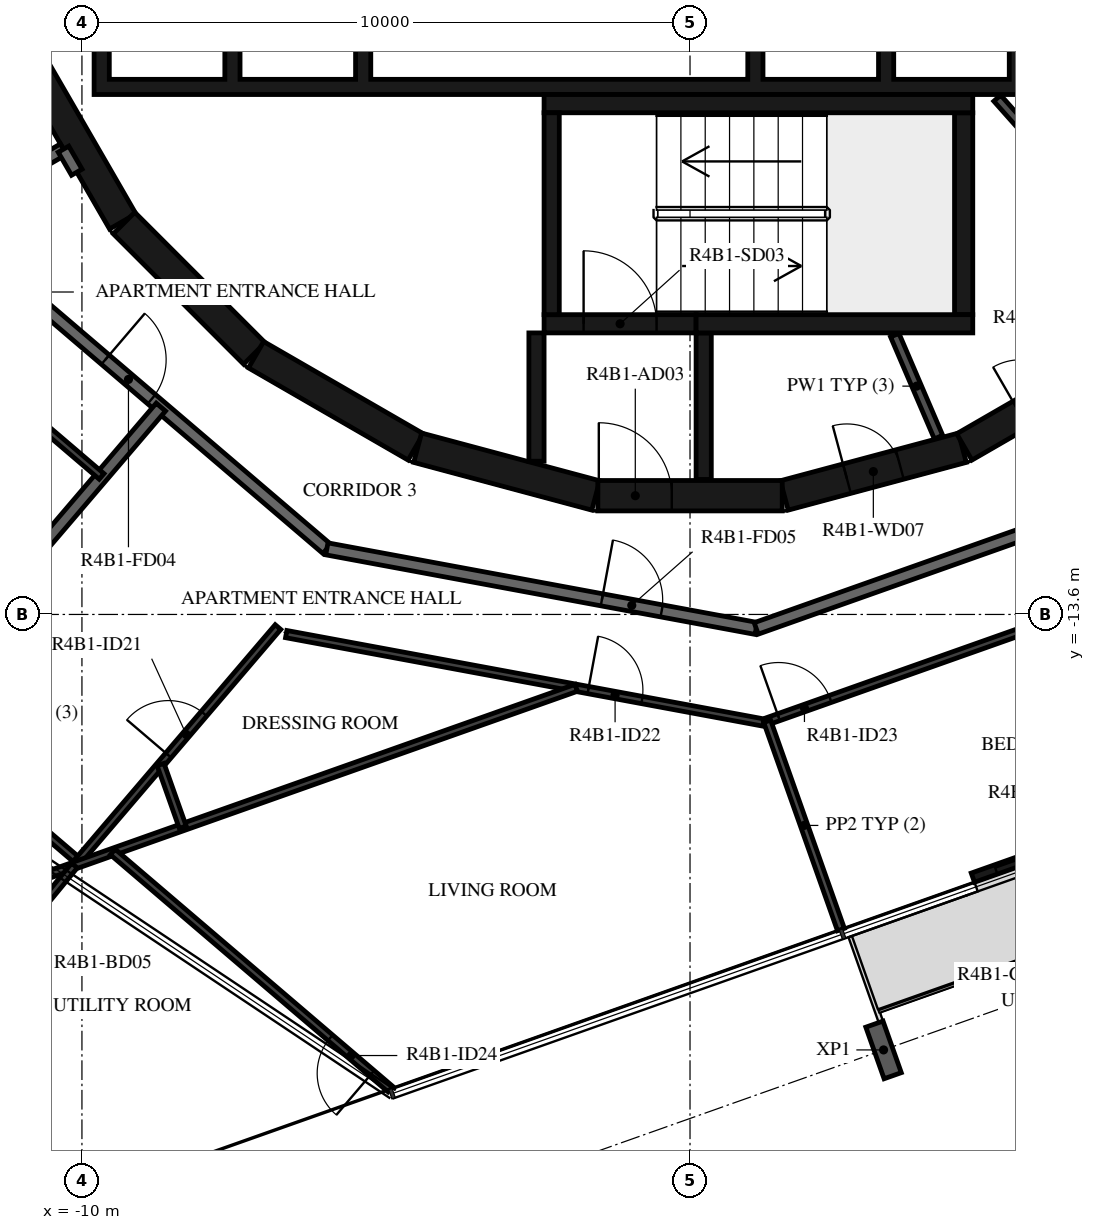
"""IFC4 building model, lengths in metres.
Left out: names, types, materials, properties, quantities, classifications, styles, units other than length and angle.
Written with IfcOpenShell. Run it as: python <this file> out.ifc"""

import sys

from ifc_helpers import new_model, si_unit, direction, frame, frame_2d, origin, origin_2d, place, context, subcontext, project, spatial, polyline, rectangle, i_section, outline, extrude, element, fill, save


model = new_model("IFC4")
c1 = context("Model", 3, precision=1e-05, world=origin(), true_north=direction((0.0, 1.0)))
c2 = subcontext(c1, "Body", "Model", "MODEL_VIEW")
j1 = project(units=[si_unit("LENGTHUNIT", "METRE"), si_unit("PLANEANGLEUNIT", "RADIAN")], contexts=[c1])
p1 = place(None, origin())
s1 = spatial("IfcSite", under=j1, at=p1, CompositionType="ELEMENT")
p2 = place(p1, origin())
s2 = spatial("IfcBuilding", under=s1, at=p2, CompositionType="ELEMENT")
p3 = place(p2, frame((0.0, 0.0, 162.2)))
s3 = spatial("IfcBuildingStorey", under=s2, at=p3, CompositionType="ELEMENT", Elevation=162.2)
p4 = place(p3, frame((3.183, -20.761, -0.38), z_axis=(0.0, 0.0, 1.0), x_axis=(-0.942641392079, -0.333807138839, 0.0)))
e1 = element("IfcColumn", 1, at=p4, inside=s3, PredefinedType="COLUMN", context=c2, shape_type="SweptSolid", body=[
    extrude(i_section(OverallWidth=0.3, OverallDepth=0.9, WebThickness=0.019, FlangeThickness=0.035, FilletRadius=0.03, at=origin_2d()), origin(), (0.0, 0.0, 1.0), 3.5),
])
p5 = place(p3, frame((4.652, -17.929, 0.0), z_axis=(0.0, 0.0, 1.0), x_axis=(0.942620722428, 0.333865502335, 0.0)))
e2 = element("IfcWall", 2, at=p5, inside=s3, PredefinedType="STANDARD", context=c2, shape_type="SweptSolid", body=[
    extrude(rectangle(XDim=3.2, YDim=0.16, at=frame_2d((1.6, 0.0))), origin(), (0.0, 0.0, 1.0), 3.12),
])
p6 = place(p5, frame((0.4, 0.0, 0.0)))
e3 = element("IfcOpeningElement", 3, at=p6, cuts=e2, PredefinedType="OPENING", context=c2, shape_type="SweptSolid", body=[
    extrude(rectangle(XDim=2.4, YDim=2.4, at=frame_2d((1.2, 1.2))), frame((0.0, 0.09, 0.0), z_axis=(0.0, -1.0, 0.0), x_axis=(1.0, 0.0, 0.0)), (0.0, 0.0, 1.0), 0.18),
])
p7 = place(p3, frame((1.55, -11.643, 0.0), z_axis=(0.0, 0.0, 1.0), x_axis=(0.965948410781, 0.258734743916, 0.0)))
e4 = element("IfcWall", 4, at=p7, inside=s3, PredefinedType="SHEAR", context=c2, shape_type="SweptSolid", body=[
    extrude(rectangle(XDim=3.033, YDim=0.5, at=frame_2d((1.516, 0.0))), origin(), (0.0, 0.0, 1.0), 3.12),
])
p8 = place(p7, frame((1.066, 0.0, 0.0)))
e5 = element("IfcOpeningElement", 5, at=p8, cuts=e4, PredefinedType="OPENING", context=c2, shape_type="SweptSolid", body=[
    extrude(rectangle(XDim=0.9, YDim=2.1, at=frame_2d((0.45, 1.05))), frame((0.0, 0.26, 0.0), z_axis=(0.0, -1.0, 0.0), x_axis=(1.0, 0.0, 0.0)), (0.0, 0.0, 1.0), 0.52),
])
p9 = place(p3, frame((4.51, -10.845, 0.0), z_axis=(0.0, 0.0, 1.0), x_axis=(0.865975092491, 0.500087131594, 0.0)))
e6 = element("IfcWall", 6, at=p9, inside=s3, PredefinedType="SHEAR", context=c2, shape_type="SweptSolid", body=[
    extrude(rectangle(XDim=3.033, YDim=0.5, at=frame_2d((1.516, 0.0))), origin(), (0.0, 0.0, 1.0), 3.12),
])
p10 = place(p9, frame((1.066, 0.0, 0.0)))
e7 = element("IfcOpeningElement", 7, at=p10, cuts=e6, PredefinedType="OPENING", context=c2, shape_type="SweptSolid", body=[
    extrude(rectangle(XDim=0.9, YDim=2.1, at=frame_2d((0.45, 1.05))), frame((0.0, 0.26, 0.0), z_axis=(0.0, -1.0, 0.0), x_axis=(1.0, 0.0, 0.0)), (0.0, 0.0, 1.0), 0.52),
])
p11 = place(p3, frame((-10.845, -4.51, 0.0), z_axis=(0.0, 0.0, 1.0), x_axis=(0.500087131594, -0.865975092491, 0.0)))
e8 = element("IfcWall", 8, at=p11, inside=s3, PredefinedType="SHEAR", context=c2, shape_type="SweptSolid", body=[
    extrude(rectangle(XDim=3.033, YDim=0.5, at=frame_2d((1.516, 0.0))), origin(), (0.0, 0.0, 1.0), 3.12),
])
p12 = place(p3, frame((-9.308, -7.164, 0.0), z_axis=(0.0, 0.0, 1.0), x_axis=(0.707106781187, -0.707106781187, 0.0)))
e9 = element("IfcWall", 9, at=p12, inside=s3, PredefinedType="SHEAR", context=c2, shape_type="SweptSolid", body=[
    extrude(rectangle(XDim=3.032, YDim=0.5, at=frame_2d((1.516, 0.0))), origin(), (0.0, 0.0, 1.0), 3.12),
])
for number, where, z_axis, x_axis in (
    (10, (-7.137, -9.329, 0.0), (0.0, 0.0, 1.0), (0.866, -0.5, 0.0)),
    (11, (-4.479, -10.858, 0.0), (0.0, 0.0, 1.0), (0.966, -0.259, 0.0)),
):
    element("IfcWall", number, at=place(p3, frame(where, z_axis=z_axis, x_axis=x_axis)), inside=s3, PredefinedType="SHEAR", context=c2, shape_type="SweptSolid", body=[
        extrude(rectangle(XDim=3.033, YDim=0.5, at=frame_2d((1.516, 0.0))), origin(), (0.0, 0.0, 1.0), 3.12),
    ])
p13 = place(p3, frame((-1.516, -11.647, 0.0), z_axis=(0.0, 0.0, 1.0), x_axis=(1.0, 0.0, 0.0)))
e12 = element("IfcWall", 12, at=p13, inside=s3, PredefinedType="SHEAR", context=c2, shape_type="SweptSolid", body=[
    extrude(rectangle(XDim=3.033, YDim=0.5, at=frame_2d((1.516, 0.0))), origin(), (0.0, 0.0, 1.0), 3.12),
])
p14 = place(p13, frame((0.016, 0.0, 0.0)))
e13 = element("IfcOpeningElement", 13, at=p14, cuts=e12, PredefinedType="OPENING", context=c2, shape_type="SweptSolid", body=[
    extrude(rectangle(XDim=1.2, YDim=2.1, at=frame_2d((0.6, 1.05))), frame((0.0, 0.26, 0.0), z_axis=(0.0, -1.0, 0.0), x_axis=(1.0, 0.0, 0.0)), (0.0, 0.0, 1.0), 0.52),
])
p15 = place(p3, frame((-2.275, -8.67, 0.0), z_axis=(0.0, 0.0, 1.0), x_axis=(0.0, 1.0, 0.0)))
e14 = element("IfcWall", 14, at=p15, inside=s3, PredefinedType="SHEAR", context=c2, shape_type="SweptSolid", body=[
    extrude(rectangle(XDim=3.32, YDim=0.25, at=frame_2d((1.66, 0.0))), origin(), (0.0, 0.0, 1.0), 3.12),
])
p16 = place(p3, frame((-2.4, -5.2, 0.0), z_axis=(0.0, 0.0, 1.0), x_axis=(1.0, 0.0, 0.0)))
e15 = element("IfcWall", 15, at=p16, inside=s3, PredefinedType="SHEAR", context=c2, shape_type="SweptSolid", body=[
    extrude(rectangle(XDim=7.05, YDim=0.3, at=frame_2d((3.525, 0.0))), origin(), (0.0, 0.0, 1.0), 3.12),
])
p17 = place(p3, frame((4.5, -8.67, 0.0), z_axis=(0.0, 0.0, 1.0), x_axis=(0.0, 1.0, 0.0)))
e16 = element("IfcWall", 16, at=p17, inside=s3, PredefinedType="SHEAR", context=c2, shape_type="SweptSolid", body=[
    extrude(rectangle(XDim=3.32, YDim=0.3, at=frame_2d((1.66, 0.0))), origin(), (0.0, 0.0, 1.0), 3.12),
])
p18 = place(p3, frame((0.1, -8.82, 0.0), z_axis=(0.0, 0.0, 1.0), x_axis=(1.0, 0.0, 0.0)))
e17 = element("IfcWall", 17, at=p18, inside=s3, PredefinedType="SHEAR", context=c2, shape_type="SweptSolid", body=[
    extrude(rectangle(XDim=4.55, YDim=0.3, at=frame_2d((2.275, 0.0))), origin(), (0.0, 0.0, 1.0), 3.12),
])
p19 = place(p3, frame((-2.4, -8.82, 0.0), z_axis=(0.0, 0.0, 1.0), x_axis=(1.0, 0.0, 0.0)))
e18 = element("IfcWall", 18, at=p19, inside=s3, PredefinedType="SHEAR", context=c2, shape_type="SweptSolid", body=[
    extrude(rectangle(XDim=2.5, YDim=0.3, at=frame_2d((1.25, 0.0))), origin(), (0.0, 0.0, 1.0), 3.12),
])
p20 = place(p19, frame((0.65, 0.0, 0.0)))
e19 = element("IfcOpeningElement", 19, at=p20, cuts=e18, PredefinedType="OPENING", context=c2, shape_type="SweptSolid", body=[
    extrude(rectangle(XDim=1.2, YDim=2.1, at=frame_2d((0.6, 1.05))), frame((0.0, 0.16, 0.0), z_axis=(0.0, -1.0, 0.0), x_axis=(1.0, 0.0, 0.0)), (0.0, 0.0, 1.0), 0.32),
])
p21 = place(p3, frame((-2.525, -8.97, 0.0), z_axis=(0.0, 0.0, 1.0), x_axis=(0.0, -1.0, 0.0)))
e20 = element("IfcWall", 20, at=p21, inside=s3, PredefinedType="SHEAR", context=c2, shape_type="SweptSolid", body=[
    extrude(rectangle(XDim=2.11, YDim=0.25, at=frame_2d((1.055, 0.0))), origin(), (0.0, 0.0, 1.0), 3.12),
])
p22 = place(p3, frame((0.225, -8.97, 0.0), z_axis=(0.0, 0.0, 1.0), x_axis=(0.0, -1.0, 0.0)))
e21 = element("IfcWall", 21, at=p22, inside=s3, PredefinedType="SHEAR", context=c2, shape_type="SweptSolid", body=[
    extrude(rectangle(XDim=2.41, YDim=0.25, at=frame_2d((1.205, 0.0))), origin(), (0.0, 0.0, 1.0), 3.12),
])
p23 = place(p3, origin())
e22 = element("IfcWall", 22, at=p23, inside=s3, PredefinedType="SHEAR", context=c2, shape_type="SweptSolid", body=[
    extrude(outline(polyline([(9.8, -5.05), (9.8, -4.8), (9.8, -1.9), (9.55, -1.9), (9.55, -4.8), (7.65, -4.8), (7.65, -1.9), (7.4, -1.9), (7.4, -4.8), (5.5, -4.8), (5.5, -1.9), (5.25, -1.9), (5.25, -4.8), (3.35, -4.8), (3.35, -1.9), (3.1, -1.9), (3.1, -4.8), (1.2, -4.8), (1.2, -1.9), (0.95, -1.9), (0.95, -4.8), (-5.25, -4.8), (-5.25, -1.9), (-5.5, -1.9), (-5.5, -4.8), (-7.4, -4.8), (-7.4, -1.9), (-7.65, -1.9), (-7.65, -4.8), (-9.55, -4.8), (-9.55, -1.9), (-9.8, -1.9), (-9.8, -4.8), (-9.8, -5.05), (9.8, -5.05)])), origin(), (0.0, 0.0, 1.0), 3.12),
])
p24 = place(p3, frame((7.842, -8.248, 0.0), z_axis=(0.0, 0.0, 1.0), x_axis=(-0.66446128181, 0.747322691329, 0.0)))
e23 = element("IfcWall", 23, at=p24, inside=s3, PredefinedType="PARTITIONING", context=c2, shape_type="SweptSolid", body=[
    extrude(rectangle(XDim=4.198, YDim=0.15, at=frame_2d((2.099, 0.0))), origin(), (0.0, 0.0, 1.0), 3.12),
])
p25 = place(p3, frame((3.367, -9.007, 0.0), z_axis=(0.0, 0.0, 1.0), x_axis=(0.394387482265, -0.918944238696, 0.0)))
e24 = element("IfcWall", 24, at=p25, inside=s3, PredefinedType="PARTITIONING", context=c2, shape_type="SweptSolid", body=[
    extrude(rectangle(XDim=1.825, YDim=0.15, at=frame_2d((0.913, 0.0))), origin(), (0.0, 0.0, 1.0), 3.12),
])
p26 = place(p3, frame((-10.303, -5.949, 0.0), z_axis=(0.0, 0.0, 1.0), x_axis=(-0.866021168401, -0.500007335828, 0.0)))
e25 = element("IfcWall", 25, at=p26, inside=s3, PredefinedType="STANDARD", context=c2, shape_type="SweptSolid", body=[
    extrude(rectangle(XDim=1.731, YDim=0.2, at=frame_2d((0.865, 0.0))), origin(), (0.0, 0.0, 1.0), 3.12),
])
p27 = place(p3, frame((-11.433, -7.858, 0.0), z_axis=(0.0, 0.0, 1.0), x_axis=(0.760412154545, -0.649440801937, 0.0)))
e26 = element("IfcWall", 26, at=p27, inside=s3, PredefinedType="STANDARD", context=c2, shape_type="SweptSolid", body=[
    extrude(rectangle(XDim=7.181, YDim=0.2, at=frame_2d((3.59, 0.0))), origin(), (0.0, 0.0, 1.0), 3.12),
])
p28 = place(p27, frame((2.39, 0.0, 0.0)))
e27 = element("IfcOpeningElement", 27, at=p28, cuts=e26, PredefinedType="OPENING", context=c2, shape_type="SweptSolid", body=[
    extrude(rectangle(XDim=1.0, YDim=2.1, at=frame_2d((0.5, 1.05))), frame((0.0, 0.11, 0.0), z_axis=(0.0, -1.0, 0.0), x_axis=(1.0, 0.0, 0.0)), (0.0, 0.0, 1.0), 0.22),
])
p29 = place(p3, frame((-10.303, -5.949, 0.0), z_axis=(0.0, 0.0, 1.0), x_axis=(0.499980071345, -0.866036909293, 0.0)))
e28 = element("IfcWall", 28, at=p29, inside=s3, PredefinedType="STANDARD", context=c2, shape_type="SweptSolid", body=[
    extrude(rectangle(XDim=0.438, YDim=0.2, at=frame_2d((0.219, 0.0))), origin(), (0.0, 0.0, 1.0), 3.12),
])
p30 = place(p3, frame((-5.972, -12.521, 0.0), z_axis=(0.0, 0.0, 1.0), x_axis=(0.983256068163, -0.18222926335, 0.0)))
e29 = element("IfcWall", 29, at=p30, inside=s3, PredefinedType="STANDARD", context=c2, shape_type="SweptSolid", body=[
    extrude(rectangle(XDim=7.181, YDim=0.2, at=frame_2d((3.59, 0.0))), origin(), (0.0, 0.0, 1.0), 3.12),
])
p31 = place(p30, frame((4.6, 0.0, 0.0)))
e30 = element("IfcOpeningElement", 30, at=p31, cuts=e29, PredefinedType="OPENING", context=c2, shape_type="SweptSolid", body=[
    extrude(rectangle(XDim=1.0, YDim=2.1, at=frame_2d((0.5, 1.05))), frame((0.0, 0.11, 0.0), z_axis=(0.0, -1.0, 0.0), x_axis=(1.0, 0.0, 0.0)), (0.0, 0.0, 1.0), 0.22),
])
p32 = place(p3, frame((1.088, -13.83, 0.0), z_axis=(0.0, 0.0, 1.0), x_axis=(0.942648397945, 0.333787354241, 0.0)))
e31 = element("IfcWall", 31, at=p32, inside=s3, PredefinedType="STANDARD", context=c2, shape_type="SweptSolid", body=[
    extrude(rectangle(XDim=7.181, YDim=0.2, at=frame_2d((3.591, 0.0))), origin(), (0.0, 0.0, 1.0), 3.12),
])
p33 = place(p3, frame((-12.441, -14.569, 0.0), z_axis=(0.0, 0.0, 1.0), x_axis=(0.649446013128, 0.760407703822, 0.0)))
e32 = element("IfcWall", 32, at=p33, inside=s3, PredefinedType="STANDARD", context=c2, shape_type="SweptSolid", body=[
    extrude(rectangle(XDim=5.758, YDim=0.2, at=frame_2d((2.879, 0.0))), origin(), (0.0, 0.0, 1.0), 3.12),
])
p34 = place(p3, frame((-12.713, -8.737, 0.0), z_axis=(0.0, 0.0, 1.0), x_axis=(0.760420863476, -0.649430604754, 0.0)))
e33 = element("IfcWall", 33, at=p34, inside=s3, PredefinedType="PARTITIONING", context=c2, shape_type="SweptSolid", body=[
    extrude(rectangle(XDim=3.992, YDim=0.12, at=frame_2d((1.996, 0.0))), origin(), (0.0, 0.0, 1.0), 3.12),
])
p35 = place(p3, frame((-12.231, -15.804, 0.0), z_axis=(0.0, 0.0, 1.0), x_axis=(0.760403625387, -0.649450788357, 0.0)))
e34 = element("IfcWall", 34, at=p35, inside=s3, PredefinedType="PARTITIONING", context=c2, shape_type="SweptSolid", body=[
    extrude(rectangle(XDim=2.852, YDim=0.12, at=frame_2d((1.426, 0.0))), origin(), (0.0, 0.0, 1.0), 3.12),
])
p36 = place(p35, frame((1.0, 0.0, 0.0)))
e35 = element("IfcOpeningElement", 35, at=p36, cuts=e34, PredefinedType="OPENING", context=c2, shape_type="SweptSolid", body=[
    extrude(rectangle(XDim=0.8, YDim=2.1, at=frame_2d((0.4, 1.05))), frame((0.0, 0.07, 0.0), z_axis=(0.0, -1.0, 0.0), x_axis=(1.0, 0.0, 0.0)), (0.0, 0.0, 1.0), 0.14),
])
p37 = place(p3, frame((-10.063, -17.656, 0.0), z_axis=(0.0, 0.0, 1.0), x_axis=(0.649451567172, 0.760402960211, 0.0)))
e36 = element("IfcWall", 36, at=p37, inside=s3, PredefinedType="PARTITIONING", context=c2, shape_type="SweptSolid", body=[
    extrude(rectangle(XDim=5.061, YDim=0.12, at=frame_2d((2.531, 0.0))), origin(), (0.0, 0.0, 1.0), 3.12),
])
p38 = place(p37, frame((2.288, 0.0, 0.0)))
e37 = element("IfcOpeningElement", 37, at=p38, cuts=e36, PredefinedType="OPENING", context=c2, shape_type="SweptSolid", body=[
    extrude(rectangle(XDim=0.9, YDim=2.1, at=frame_2d((0.45, 1.05))), frame((0.0, 0.07, 0.0), z_axis=(0.0, -1.0, 0.0), x_axis=(1.0, 0.0, 0.0)), (0.0, 0.0, 1.0), 0.14),
])
p39 = place(p3, frame((-6.641, -13.923, 0.0), z_axis=(0.0, 0.0, 1.0), x_axis=(0.983250157272, -0.182261153912, 0.0)))
e38 = element("IfcWall", 38, at=p39, inside=s3, PredefinedType="PARTITIONING", context=c2, shape_type="SweptSolid", body=[
    extrude(rectangle(XDim=7.985, YDim=0.12, at=frame_2d((3.992, 0.0))), origin(), (0.0, 0.0, 1.0), 3.12),
])
p40 = place(p39, frame((5.051, 0.0, 0.0)))
e39 = element("IfcOpeningElement", 39, at=p40, cuts=e38, PredefinedType="OPENING", context=c2, shape_type="SweptSolid", body=[
    extrude(rectangle(XDim=0.9, YDim=2.1, at=frame_2d((0.45, 1.05))), frame((0.0, 0.07, 0.0), z_axis=(0.0, -1.0, 0.0), x_axis=(1.0, 0.0, 0.0)), (0.0, 0.0, 1.0), 0.14),
])
p41 = place(p3, frame((1.269, -15.357, 0.0), z_axis=(0.0, 0.0, 1.0), x_axis=(0.942639442898, 0.333812643101, 0.0)))
e40 = element("IfcWall", 40, at=p41, inside=s3, PredefinedType="PARTITIONING", context=c2, shape_type="SweptSolid", body=[
    extrude(rectangle(XDim=7.86, YDim=0.12, at=frame_2d((3.93, 0.0))), origin(), (0.0, 0.0, 1.0), 3.12),
])
p42 = place(p41, frame((0.2, 0.0, 0.0)))
e41 = element("IfcOpeningElement", 41, at=p42, cuts=e40, PredefinedType="OPENING", context=c2, shape_type="SweptSolid", body=[
    extrude(rectangle(XDim=0.9, YDim=2.1, at=frame_2d((0.45, 1.05))), frame((0.0, 0.07, 0.0), z_axis=(0.0, -1.0, 0.0), x_axis=(1.0, 0.0, 0.0)), (0.0, 0.0, 1.0), 0.14),
])
p43 = place(p3, frame((-1.871, -14.807, 0.0), z_axis=(0.0, 0.0, 1.0), x_axis=(-0.942640759962, -0.333808923874, 0.0)))
e42 = element("IfcWall", 42, at=p43, inside=s3, PredefinedType="PARTITIONING", context=c2, shape_type="SweptSolid", body=[
    extrude(rectangle(XDim=11.234, YDim=0.12, at=frame_2d((5.617, 0.0))), origin(), (0.0, 0.0, 1.0), 3.12),
])
p44 = place(p3, frame((-15.146, -23.841, 0.0), z_axis=(0.0, 0.0, 1.0), x_axis=(0.634970373647, 0.772536487547, 0.0)))
e43 = element("IfcWall", 43, at=p44, inside=s3, PredefinedType="PARTITIONING", context=c2, shape_type="SweptSolid", body=[
    extrude(rectangle(XDim=7.912, YDim=0.12, at=frame_2d((3.956, 0.0))), origin(), (0.0, 0.0, 1.0), 3.12),
])
p45 = place(p44, frame((0.5, 0.0, 0.0)))
e44 = element("IfcOpeningElement", 44, at=p45, cuts=e43, PredefinedType="OPENING", context=c2, shape_type="SweptSolid", body=[
    extrude(rectangle(XDim=0.9, YDim=2.1, at=frame_2d((0.45, 1.05))), frame((0.0, 0.07, 0.0), z_axis=(0.0, -1.0, 0.0), x_axis=(1.0, 0.0, 0.0)), (0.0, 0.0, 1.0), 0.14),
])
p46 = place(p3, frame((-8.342, -17.098, 0.0), z_axis=(0.0, 0.0, 1.0), x_axis=(-0.333801646268, 0.942643337084, 0.0)))
e45 = element("IfcWall", 45, at=p46, inside=s3, PredefinedType="PARTITIONING", context=c2, shape_type="SweptSolid", body=[
    extrude(rectangle(XDim=1.093, YDim=0.12, at=frame_2d((0.546, 0.0))), origin(), (0.0, 0.0, 1.0), 3.12),
])
p47 = place(p3, frame((-4.927, -21.406, 0.0), z_axis=(0.0, 0.0, 1.0), x_axis=(-0.760409236665, 0.649444218385, 0.0)))
e46 = element("IfcWall", 46, at=p47, inside=s3, PredefinedType="PARTITIONING", context=c2, shape_type="SweptSolid", body=[
    extrude(rectangle(XDim=6.004, YDim=0.12, at=frame_2d((3.002, 0.0))), origin(), (0.0, 0.0, 1.0), 3.12),
])
p48 = place(p47, frame((0.4, 0.0, 0.0)))
e47 = element("IfcOpeningElement", 47, at=p48, cuts=e46, PredefinedType="OPENING", context=c2, shape_type="SweptSolid", body=[
    extrude(rectangle(XDim=0.9, YDim=2.1, at=frame_2d((0.45, 1.05))), frame((0.0, 0.07, 0.0), z_axis=(0.0, -1.0, 0.0), x_axis=(1.0, 0.0, 0.0)), (0.0, 0.0, 1.0), 0.14),
])
p49 = place(p3, frame((2.482, -18.782, 0.0), z_axis=(0.0, 0.0, 1.0), x_axis=(-0.33379364943, 0.942646168825, 0.0)))
e48 = element("IfcWall", 48, at=p49, inside=s3, PredefinedType="PARTITIONING", context=c2, shape_type="SweptSolid", body=[
    extrude(rectangle(XDim=3.633, YDim=0.12, at=frame_2d((1.816, 0.0))), origin(), (0.0, 0.0, 1.0), 2.73),
])
p50 = place(p6, origin())
e49 = element("IfcDoor", 49, at=p50, inside=s3, OperationType="DOUBLE_DOOR_SLIDING", PredefinedType="DOOR", context=c2, shape_type="SweptSolid", body=[
    extrude(rectangle(XDim=2.4, YDim=2.4, at=frame_2d((1.2, 1.2))), frame((0.0, 0.025, 0.0), z_axis=(0.0, -1.0, 0.0), x_axis=(1.0, 0.0, 0.0)), (0.0, 0.0, 1.0), 0.05),
])
fill(e3, e49)
p51 = place(p20, origin())
e50 = element("IfcDoor", 50, at=p51, inside=s3, OperationType="SINGLE_SWING_LEFT", PredefinedType="DOOR", context=c2, shape_type="SweptSolid", body=[
    extrude(rectangle(XDim=1.2, YDim=2.1, at=frame_2d((0.6, 1.05))), frame((0.0, 0.025, 0.0), z_axis=(0.0, -1.0, 0.0), x_axis=(1.0, 0.0, 0.0)), (0.0, 0.0, 1.0), 0.05),
])
fill(e19, e50)
p52 = place(p14, origin())
e51 = element("IfcDoor", 51, at=p52, inside=s3, OperationType="SINGLE_SWING_RIGHT", PredefinedType="DOOR", context=c2, shape_type="SweptSolid", body=[
    extrude(rectangle(XDim=1.2, YDim=2.1, at=frame_2d((0.6, 1.05))), frame((0.0, 0.025, 0.0), z_axis=(0.0, -1.0, 0.0), x_axis=(1.0, 0.0, 0.0)), (0.0, 0.0, 1.0), 0.05),
])
fill(e13, e51)
p53 = place(p8, origin())
e52 = element("IfcDoor", 52, at=p53, inside=s3, OperationType="SINGLE_SWING_LEFT", PredefinedType="DOOR", context=c2, shape_type="SweptSolid", body=[
    extrude(rectangle(XDim=0.9, YDim=2.1, at=frame_2d((0.45, 1.05))), frame((0.0, 0.025, 0.0), z_axis=(0.0, -1.0, 0.0), x_axis=(1.0, 0.0, 0.0)), (0.0, 0.0, 1.0), 0.05),
])
fill(e5, e52)
p54 = place(p28, origin())
e53 = element("IfcDoor", 53, at=p54, inside=s3, OperationType="SINGLE_SWING_RIGHT", PredefinedType="DOOR", context=c2, shape_type="SweptSolid", body=[
    extrude(rectangle(XDim=1.0, YDim=2.1, at=frame_2d((0.5, 1.05))), frame((0.0, 0.025, 0.0), z_axis=(0.0, -1.0, 0.0), x_axis=(1.0, 0.0, 0.0)), (0.0, 0.0, 1.0), 0.05),
])
fill(e27, e53)
p55 = place(p31, origin())
e54 = element("IfcDoor", 54, at=p55, inside=s3, OperationType="SINGLE_SWING_LEFT", PredefinedType="DOOR", context=c2, shape_type="SweptSolid", body=[
    extrude(rectangle(XDim=1.0, YDim=2.1, at=frame_2d((0.5, 1.05))), frame((0.0, 0.025, 0.0), z_axis=(0.0, -1.0, 0.0), x_axis=(1.0, 0.0, 0.0)), (0.0, 0.0, 1.0), 0.05),
])
fill(e30, e54)
p56 = place(p38, origin())
e55 = element("IfcDoor", 55, at=p56, inside=s3, OperationType="SINGLE_SWING_LEFT", PredefinedType="DOOR", context=c2, shape_type="SweptSolid", body=[
    extrude(rectangle(XDim=0.9, YDim=2.1, at=frame_2d((0.45, 1.05))), frame((0.0, 0.025, 0.0), z_axis=(0.0, -1.0, 0.0), x_axis=(1.0, 0.0, 0.0)), (0.0, 0.0, 1.0), 0.05),
])
fill(e37, e55)
p57 = place(p40, origin())
e56 = element("IfcDoor", 56, at=p57, inside=s3, OperationType="SINGLE_SWING_LEFT", PredefinedType="DOOR", context=c2, shape_type="SweptSolid", body=[
    extrude(rectangle(XDim=0.9, YDim=2.1, at=frame_2d((0.45, 1.05))), frame((0.0, 0.025, 0.0), z_axis=(0.0, -1.0, 0.0), x_axis=(1.0, 0.0, 0.0)), (0.0, 0.0, 1.0), 0.05),
])
fill(e39, e56)
p58 = place(p42, origin())
e57 = element("IfcDoor", 57, at=p58, inside=s3, OperationType="SINGLE_SWING_LEFT", PredefinedType="DOOR", context=c2, shape_type="SweptSolid", body=[
    extrude(rectangle(XDim=0.9, YDim=2.1, at=frame_2d((0.45, 1.05))), frame((0.0, 0.025, 0.0), z_axis=(0.0, -1.0, 0.0), x_axis=(1.0, 0.0, 0.0)), (0.0, 0.0, 1.0), 0.05),
])
fill(e41, e57)
p59 = place(p48, origin())
e58 = element("IfcDoor", 58, at=p59, inside=s3, OperationType="SINGLE_SWING_LEFT", PredefinedType="DOOR", context=c2, shape_type="SweptSolid", body=[
    extrude(rectangle(XDim=0.9, YDim=2.1, at=frame_2d((0.45, 1.05))), frame((0.0, 0.025, 0.0), z_axis=(0.0, -1.0, 0.0), x_axis=(1.0, 0.0, 0.0)), (0.0, 0.0, 1.0), 0.05),
])
fill(e47, e58)
save(model, sys.argv[1])
